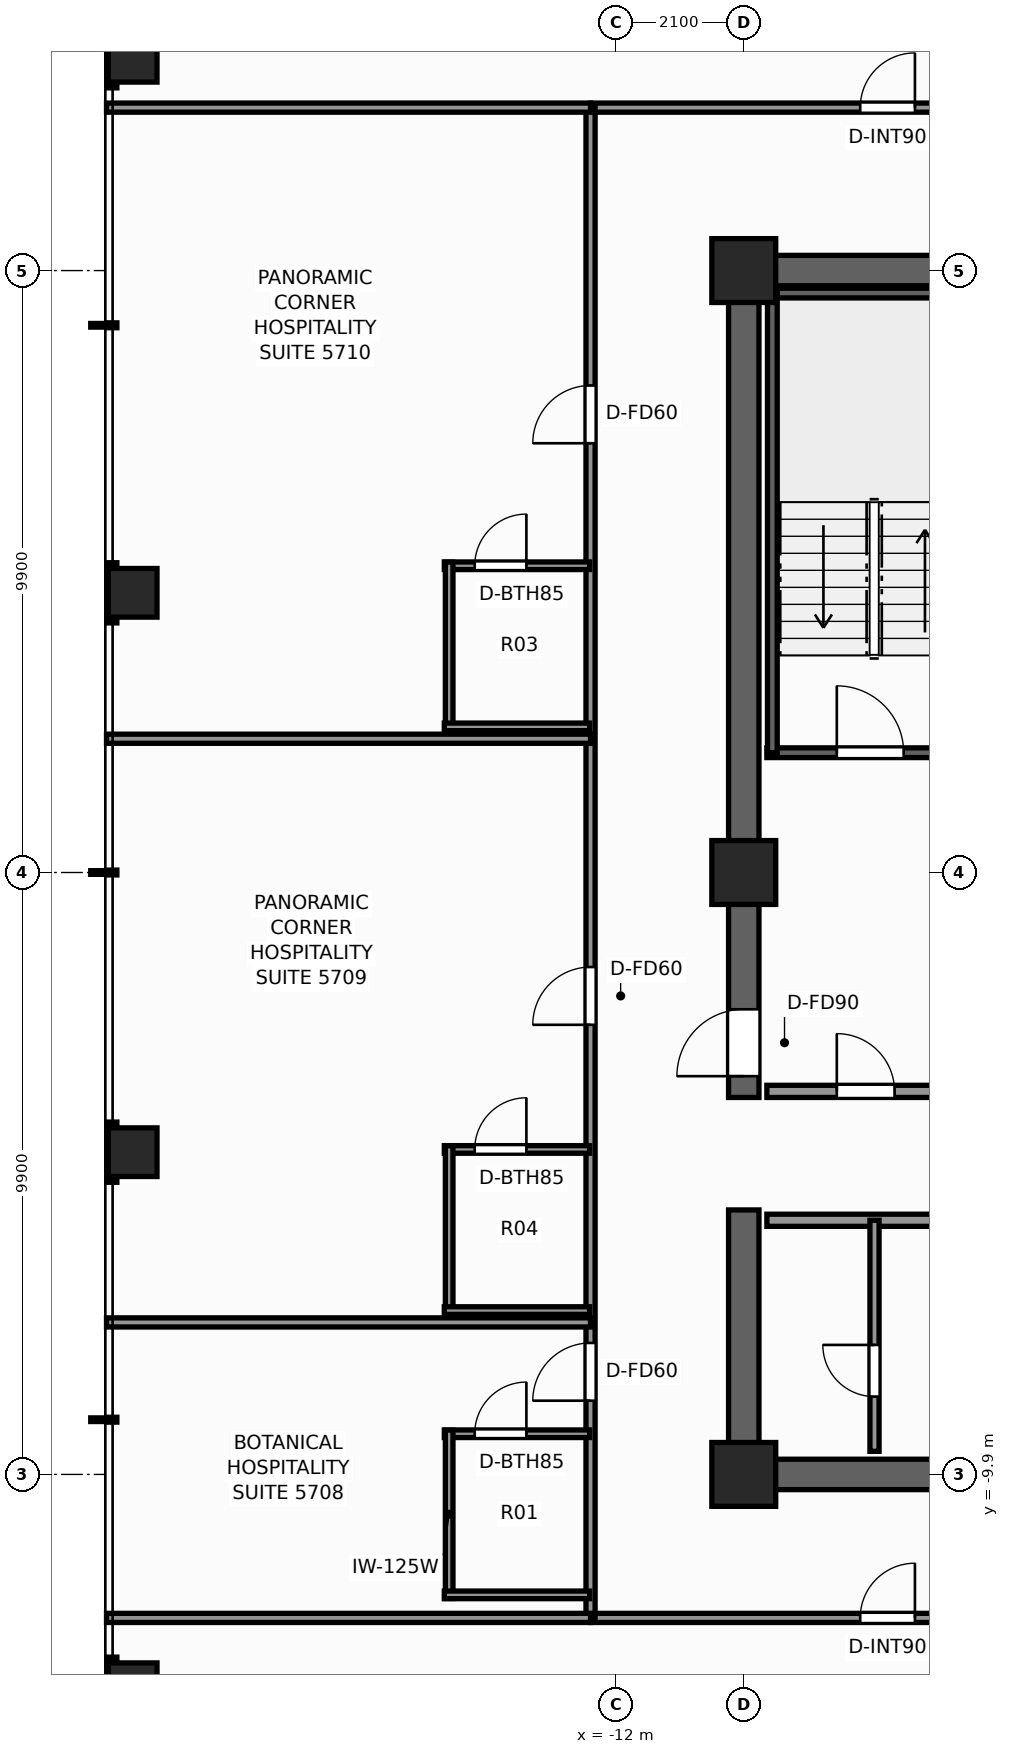
"""IFC4 building model, lengths in metres.
Left out: names, types, materials, properties, quantities, classifications, styles, units other than length and angle.
Written with IfcOpenShell. Run it as: python <this file> out.ifc"""

import sys

from ifc_helpers import new_model, si_unit, direction, frame, frame_2d, origin, origin_2d, place, context, subcontext, project, spatial, rectangle, extrude, element, fill, save


model = new_model("IFC4")
c1 = context("Model", 3, precision=1e-05, world=origin(), true_north=direction((0.0, 1.0)))
c2 = subcontext(c1, "Body", "Model", "MODEL_VIEW")
j1 = project(units=[si_unit("LENGTHUNIT", "METRE"), si_unit("PLANEANGLEUNIT", "RADIAN")], contexts=[c1])
p1 = place(None, origin())
s1 = spatial("IfcSite", under=j1, at=p1, CompositionType="ELEMENT")
p2 = place(p1, origin())
s2 = spatial("IfcBuilding", under=s1, at=p2, CompositionType="ELEMENT")
p3 = place(p2, frame((0.0, 0.0, 196.5)))
s3 = spatial("IfcBuildingStorey", under=s2, at=p3, CompositionType="ELEMENT", Elevation=196.5)
p4 = place(p3, frame((-3.54, -9.9, 0.0), z_axis=(0.0, 0.0, 1.0), x_axis=(-1.0, 0.0, 0.0)))
e1 = element("IfcWall", 1, at=p4, inside=s3, PredefinedType="SHEAR", context=c2, shape_type="SweptSolid", body=[
    extrude(rectangle(XDim=6.61, YDim=0.5, at=frame_2d((3.305, 0.0))), origin(), (0.0, 0.0, 1.0), 3.3),
])
p5 = place(p3, frame((-10.15, 9.9, 0.0), z_axis=(0.0, 0.0, 1.0), x_axis=(1.0, 0.0, 0.0)))
e2 = element("IfcWall", 2, at=p5, inside=s3, PredefinedType="SHEAR", context=c2, shape_type="SweptSolid", body=[
    extrude(rectangle(XDim=14.57, YDim=0.5, at=frame_2d((7.285, 0.0))), origin(), (0.0, 0.0, 1.0), 3.3),
])
p6 = place(p3, frame((-9.9, -9.65, 0.0), z_axis=(0.0, 0.0, 1.0), x_axis=(0.0, 1.0, 0.0)))
e3 = element("IfcWall", 3, at=p6, inside=s3, PredefinedType="SHEAR", context=c2, shape_type="SweptSolid", body=[
    extrude(rectangle(XDim=4.1, YDim=0.5, at=frame_2d((2.05, 0.0))), origin(), (0.0, 0.0, 1.0), 3.3),
])
p7 = place(p3, frame((-9.9, -3.7, 0.0), z_axis=(0.0, 0.0, 1.0), x_axis=(0.0, 1.0, 0.0)))
e4 = element("IfcWall", 4, at=p7, inside=s3, PredefinedType="SHEAR", context=c2, shape_type="SweptSolid", body=[
    extrude(rectangle(XDim=13.35, YDim=0.5, at=frame_2d((6.675, 0.0))), origin(), (0.0, 0.0, 1.0), 3.3),
])
p8 = place(p7, frame((0.35, 0.0, 0.0)))
e5 = element("IfcOpeningElement", 5, at=p8, cuts=e4, PredefinedType="OPENING", context=c2, shape_type="SweptSolid", body=[
    extrude(rectangle(XDim=1.1, YDim=2.2, at=frame_2d((0.55, 1.1))), frame((0.0, 0.26, 0.0), z_axis=(0.0, -1.0, 0.0), x_axis=(1.0, 0.0, 0.0)), (0.0, 0.0, 1.0), 0.52),
])
for number, where, z_axis, x_axis in (
    (6, (-9.9, -9.9, 0.0), (0.0, 0.0, 1.0), (1.0, 0.0, 0.0)),
    (7, (-9.9, 9.9, 0.0), (0.0, 0.0, 1.0), (1.0, 0.0, 0.0)),
    (8, (-9.9, 0.0, 0.0), (0.0, 0.0, 1.0), (1.0, 0.0, 0.0)),
):
    element("IfcColumn", number, at=place(p3, frame(where, z_axis=z_axis, x_axis=x_axis)), inside=s3, PredefinedType="COLUMN", context=c2, shape_type="SweptSolid", body=[
        extrude(rectangle(XDim=1.05, YDim=1.05, at=origin_2d()), origin(), (0.0, 0.0, 1.0), 3.3),
    ])
for number, where, z_axis, x_axis in (
    (9, (-19.95, -13.4, 0.0), (0.0, 0.0, 1.0), (1.0, 0.0, 0.0)),
    (10, (-19.95, -4.6, 0.0), (0.0, 0.0, 1.0), (1.0, 0.0, 0.0)),
    (11, (-19.95, 4.6, 0.0), (0.0, 0.0, 1.0), (1.0, 0.0, 0.0)),
    (12, (-19.95, 13.4, 0.0), (0.0, 0.0, 1.0), (1.0, 0.0, 0.0)),
):
    element("IfcColumn", number, at=place(p3, frame(where, z_axis=z_axis, x_axis=x_axis)), inside=s3, PredefinedType="COLUMN", context=c2, shape_type="SweptSolid", body=[
        extrude(rectangle(XDim=0.8, YDim=0.8, at=origin_2d()), origin(), (0.0, 0.0, 1.0), 3.3),
    ])
p9 = place(p3, frame((-9.52, 1.97, 0.0), z_axis=(0.0, 0.0, 1.0), x_axis=(1.0, 0.0, 0.0)))
e13 = element("IfcWall", 13, at=p9, inside=s3, PredefinedType="SHEAR", context=c2, shape_type="SweptSolid", body=[
    extrude(rectangle(XDim=3.52, YDim=0.16, at=frame_2d((1.76, 0.0))), origin(), (0.0, 0.0, 1.0), 3.3),
])
p10 = place(p9, frame((1.15, 0.0, 0.0)))
e14 = element("IfcOpeningElement", 14, at=p10, cuts=e13, PredefinedType="OPENING", context=c2, shape_type="SweptSolid", body=[
    extrude(rectangle(XDim=1.1, YDim=2.2, at=frame_2d((0.55, 1.1))), frame((0.0, 0.09, 0.0), z_axis=(0.0, -1.0, 0.0), x_axis=(1.0, 0.0, 0.0)), (0.0, 0.0, 1.0), 0.18),
])
p11 = place(p3, frame((-9.52, 9.53, 0.0), z_axis=(0.0, 0.0, 1.0), x_axis=(1.0, 0.0, 0.0)))
e15 = element("IfcWall", 15, at=p11, inside=s3, PredefinedType="SHEAR", context=c2, shape_type="SweptSolid", body=[
    extrude(rectangle(XDim=3.52, YDim=0.16, at=frame_2d((1.76, 0.0))), origin(), (0.0, 0.0, 1.0), 3.3),
])
p12 = place(p3, frame((-9.43, 1.97, 0.0), z_axis=(0.0, 0.0, 1.0), x_axis=(0.0, 1.0, 0.0)))
e16 = element("IfcWall", 16, at=p12, inside=s3, PredefinedType="SHEAR", context=c2, shape_type="SweptSolid", body=[
    extrude(rectangle(XDim=7.56, YDim=0.16, at=frame_2d((3.78, 0.0))), origin(), (0.0, 0.0, 1.0), 3.3),
])
p13 = place(p3, frame((-9.52, -3.6, 0.0), z_axis=(0.0, 0.0, 1.0), x_axis=(1.0, 0.0, 0.0)))
e17 = element("IfcWall", 17, at=p13, inside=s3, PredefinedType="SOLIDWALL", context=c2, shape_type="SweptSolid", body=[
    extrude(rectangle(XDim=3.77, YDim=0.2, at=frame_2d((1.885, 0.0))), origin(), (0.0, 0.0, 1.0), 3.08),
])
p14 = place(p13, frame((1.15, 0.0, 0.0)))
e18 = element("IfcOpeningElement", 18, at=p14, cuts=e17, PredefinedType="OPENING", context=c2, shape_type="SweptSolid", body=[
    extrude(rectangle(XDim=0.95, YDim=2.06, at=frame_2d((0.475, 1.03))), frame((0.0, 0.11, 0.0), z_axis=(0.0, -1.0, 0.0), x_axis=(1.0, 0.0, 0.0)), (0.0, 0.0, 1.0), 0.22),
])
p15 = place(p3, frame((-9.52, -5.72, 0.0), z_axis=(0.0, 0.0, 1.0), x_axis=(1.0, 0.0, 0.0)))
e19 = element("IfcWall", 19, at=p15, inside=s3, PredefinedType="SOLIDWALL", context=c2, shape_type="SweptSolid", body=[
    extrude(rectangle(XDim=5.66, YDim=0.2, at=frame_2d((2.83, 0.0))), origin(), (0.0, 0.0, 1.0), 3.08),
])
p16 = place(p15, frame((2.8, 0.0, 0.0)))
e20 = element("IfcOpeningElement", 20, at=p16, cuts=e19, PredefinedType="OPENING", context=c2, shape_type="SweptSolid", body=[
    extrude(rectangle(XDim=0.95, YDim=2.06, at=frame_2d((0.475, 1.03))), frame((0.0, 0.11, 0.0), z_axis=(0.0, -1.0, 0.0), x_axis=(1.0, 0.0, 0.0)), (0.0, 0.0, 1.0), 0.22),
])
p17 = place(p3, frame((-7.75, -9.52, 0.0), z_axis=(0.0, 0.0, 1.0), x_axis=(0.0, 1.0, 0.0)))
e21 = element("IfcWall", 21, at=p17, inside=s3, PredefinedType="PARTITIONING", context=c2, shape_type="SweptSolid", body=[
    extrude(rectangle(XDim=3.8, YDim=0.15, at=frame_2d((1.9, 0.0))), origin(), (0.0, 0.0, 1.0), 3.08),
])
p18 = place(p17, frame((0.9, 0.0, 0.0)))
e22 = element("IfcOpeningElement", 22, at=p18, cuts=e21, PredefinedType="OPENING", context=c2, shape_type="SweptSolid", body=[
    extrude(rectangle(XDim=0.85, YDim=2.03, at=frame_2d((0.425, 1.015))), frame((0.0, 0.085, 0.0), z_axis=(0.0, -1.0, 0.0), x_axis=(1.0, 0.0, 0.0)), (0.0, 0.0, 1.0), 0.17),
])
p19 = place(p3, frame((-12.42, -12.26, 0.0), z_axis=(0.0, 0.0, 1.0), x_axis=(1.0, 0.0, 0.0)))
e23 = element("IfcWall", 23, at=p19, inside=s3, PredefinedType="PARTITIONING", context=c2, shape_type="SweptSolid", body=[
    extrude(rectangle(XDim=24.84, YDim=0.15, at=frame_2d((12.42, 0.0))), origin(), (0.0, 0.0, 1.0), 2.369),
])
p20 = place(p19, frame((4.435, 0.0, 0.0)))
e24 = element("IfcOpeningElement", 24, at=p20, cuts=e23, PredefinedType="OPENING", context=c2, shape_type="SweptSolid", body=[
    extrude(rectangle(XDim=0.9, YDim=2.06, at=frame_2d((0.45, 1.03))), frame((0.0, 0.085, 0.0), z_axis=(0.0, -1.0, 0.0), x_axis=(1.0, 0.0, 0.0)), (0.0, 0.0, 1.0), 0.17),
])
p21 = place(p19, frame((19.505, 0.0, 0.0)))
e25 = element("IfcOpeningElement", 25, at=p21, cuts=e23, PredefinedType="OPENING", context=c2, shape_type="SweptSolid", body=[
    extrude(rectangle(XDim=0.9, YDim=2.06, at=frame_2d((0.45, 1.03))), frame((0.0, 0.085, 0.0), z_axis=(0.0, -1.0, 0.0), x_axis=(1.0, 0.0, 0.0)), (0.0, 0.0, 1.0), 0.17),
])
p22 = place(p3, frame((-12.42, 12.58, 0.0), z_axis=(0.0, 0.0, 1.0), x_axis=(1.0, 0.0, 0.0)))
e26 = element("IfcWall", 26, at=p22, inside=s3, PredefinedType="PARTITIONING", context=c2, shape_type="SweptSolid", body=[
    extrude(rectangle(XDim=24.84, YDim=0.15, at=frame_2d((12.42, 0.0))), origin(), (0.0, 0.0, 1.0), 2.369),
])
p23 = place(p22, frame((4.435, 0.0, 0.0)))
e27 = element("IfcOpeningElement", 27, at=p23, cuts=e26, PredefinedType="OPENING", context=c2, shape_type="SweptSolid", body=[
    extrude(rectangle(XDim=0.9, YDim=2.06, at=frame_2d((0.45, 1.03))), frame((0.0, 0.085, 0.0), z_axis=(0.0, -1.0, 0.0), x_axis=(1.0, 0.0, 0.0)), (0.0, 0.0, 1.0), 0.17),
])
p24 = place(p22, frame((19.505, 0.0, 0.0)))
e28 = element("IfcOpeningElement", 28, at=p24, cuts=e26, PredefinedType="OPENING", context=c2, shape_type="SweptSolid", body=[
    extrude(rectangle(XDim=0.9, YDim=2.06, at=frame_2d((0.45, 1.03))), frame((0.0, 0.085, 0.0), z_axis=(0.0, -1.0, 0.0), x_axis=(1.0, 0.0, 0.0)), (0.0, 0.0, 1.0), 0.17),
])
p25 = place(p3, frame((-12.42, -12.26, 0.0), z_axis=(0.0, 0.0, 1.0), x_axis=(0.0, 1.0, 0.0)))
e29 = element("IfcWall", 29, at=p25, inside=s3, PredefinedType="PARTITIONING", context=c2, shape_type="SweptSolid", body=[
    extrude(rectangle(XDim=24.84, YDim=0.15, at=frame_2d((12.42, 0.0))), origin(), (0.0, 0.0, 1.0), 2.369),
])
p26 = place(p25, frame((3.573, 0.0, 0.0)))
e30 = element("IfcOpeningElement", 30, at=p26, cuts=e29, PredefinedType="OPENING", context=c2, shape_type="SweptSolid", body=[
    extrude(rectangle(XDim=0.95, YDim=2.06, at=frame_2d((0.475, 1.03))), frame((0.0, 0.085, 0.0), z_axis=(0.0, -1.0, 0.0), x_axis=(1.0, 0.0, 0.0)), (0.0, 0.0, 1.0), 0.17),
])
p27 = place(p25, frame((9.755, 0.0, 0.0)))
e31 = element("IfcOpeningElement", 31, at=p27, cuts=e29, PredefinedType="OPENING", context=c2, shape_type="SweptSolid", body=[
    extrude(rectangle(XDim=0.95, YDim=2.06, at=frame_2d((0.475, 1.03))), frame((0.0, 0.085, 0.0), z_axis=(0.0, -1.0, 0.0), x_axis=(1.0, 0.0, 0.0)), (0.0, 0.0, 1.0), 0.17),
])
p28 = place(p25, frame((19.32, 0.0, 0.0)))
e32 = element("IfcOpeningElement", 32, at=p28, cuts=e29, PredefinedType="OPENING", context=c2, shape_type="SweptSolid", body=[
    extrude(rectangle(XDim=0.95, YDim=2.06, at=frame_2d((0.475, 1.03))), frame((0.0, 0.085, 0.0), z_axis=(0.0, -1.0, 0.0), x_axis=(1.0, 0.0, 0.0)), (0.0, 0.0, 1.0), 0.17),
])
for number, where, z_axis, x_axis in (
    (33, (-20.38, -12.26, 0.0), (0.0, 0.0, 1.0), (1.0, 0.0, 0.0)),
    (34, (-20.38, 12.58, 0.0), (0.0, 0.0, 1.0), (1.0, 0.0, 0.0)),
):
    element("IfcWall", number, at=place(p3, frame(where, z_axis=z_axis, x_axis=x_axis)), inside=s3, PredefinedType="PARTITIONING", context=c2, shape_type="SweptSolid", body=[
        extrude(rectangle(XDim=7.96, YDim=0.15, at=frame_2d((3.98, 0.0))), origin(), (0.0, 0.0, 1.0), 2.369),
    ])
p29 = place(p3, frame((-20.38, -7.4, 0.0), z_axis=(0.0, 0.0, 1.0), x_axis=(1.0, 0.0, 0.0)))
e35 = element("IfcWall", 35, at=p29, inside=s3, PredefinedType="PARTITIONING", context=c2, shape_type="SweptSolid", body=[
    extrude(rectangle(XDim=7.96, YDim=0.15, at=frame_2d((3.98, 0.0))), origin(), (0.0, 0.0, 1.0), 2.453),
])
p30 = place(p3, frame((-14.825, -9.231, 0.0), z_axis=(0.0, 0.0, 1.0), x_axis=(1.0, 0.0, 0.0)))
e36 = element("IfcWall", 36, at=p30, inside=s3, PredefinedType="PARTITIONING", context=c2, shape_type="SweptSolid", body=[
    extrude(rectangle(XDim=2.39, YDim=0.125, at=frame_2d((1.195, 0.0))), origin(), (0.0, 0.0, 1.0), 3.08),
])
p31 = place(p30, frame((0.5, 0.0, 0.0)))
e37 = element("IfcOpeningElement", 37, at=p31, cuts=e36, PredefinedType="OPENING", context=c2, shape_type="SweptSolid", body=[
    extrude(rectangle(XDim=0.85, YDim=2.03, at=frame_2d((0.425, 1.015))), frame((0.0, 0.073, 0.0), z_axis=(0.0, -1.0, 0.0), x_axis=(1.0, 0.0, 0.0)), (0.0, 0.0, 1.0), 0.145),
])
p32 = place(p3, frame((-14.745, -11.941, 0.0), z_axis=(0.0, 0.0, 1.0), x_axis=(0.0, 1.0, 0.0)))
e38 = element("IfcWall", 38, at=p32, inside=s3, PredefinedType="PARTITIONING", context=c2, shape_type="SweptSolid", body=[
    extrude(rectangle(XDim=2.77, YDim=0.125, at=frame_2d((1.385, 0.0))), origin(), (0.0, 0.0, 1.0), 2.369),
])
p33 = place(p3, frame((-14.825, -11.881, 0.0), z_axis=(0.0, 0.0, 1.0), x_axis=(1.0, 0.0, 0.0)))
e39 = element("IfcWall", 39, at=p33, inside=s3, PredefinedType="PARTITIONING", context=c2, shape_type="SweptSolid", body=[
    extrude(rectangle(XDim=2.39, YDim=0.125, at=frame_2d((1.195, 0.0))), origin(), (0.0, 0.0, 1.0), 3.08),
])
p34 = place(p3, frame((-20.38, 2.2, 0.0), z_axis=(0.0, 0.0, 1.0), x_axis=(1.0, 0.0, 0.0)))
e40 = element("IfcWall", 40, at=p34, inside=s3, PredefinedType="PARTITIONING", context=c2, shape_type="SweptSolid", body=[
    extrude(rectangle(XDim=7.96, YDim=0.15, at=frame_2d((3.98, 0.0))), origin(), (0.0, 0.0, 1.0), 2.453),
])
p35 = place(p3, frame((-14.825, -4.555, 0.0), z_axis=(0.0, 0.0, 1.0), x_axis=(1.0, 0.0, 0.0)))
e41 = element("IfcWall", 41, at=p35, inside=s3, PredefinedType="PARTITIONING", context=c2, shape_type="SweptSolid", body=[
    extrude(rectangle(XDim=2.39, YDim=0.125, at=frame_2d((1.195, 0.0))), origin(), (0.0, 0.0, 1.0), 2.369),
])
p36 = place(p35, frame((0.5, 0.0, 0.0)))
e42 = element("IfcOpeningElement", 42, at=p36, cuts=e41, PredefinedType="OPENING", context=c2, shape_type="SweptSolid", body=[
    extrude(rectangle(XDim=0.85, YDim=2.03, at=frame_2d((0.425, 1.015))), frame((0.0, 0.073, 0.0), z_axis=(0.0, -1.0, 0.0), x_axis=(1.0, 0.0, 0.0)), (0.0, 0.0, 1.0), 0.145),
])
p37 = place(p3, frame((-14.745, -7.265, 0.0), z_axis=(0.0, 0.0, 1.0), x_axis=(0.0, 1.0, 0.0)))
e43 = element("IfcWall", 43, at=p37, inside=s3, PredefinedType="PARTITIONING", context=c2, shape_type="SweptSolid", body=[
    extrude(rectangle(XDim=2.77, YDim=0.125, at=frame_2d((1.385, 0.0))), origin(), (0.0, 0.0, 1.0), 2.369),
])
p38 = place(p3, frame((-14.825, -7.205, 0.0), z_axis=(0.0, 0.0, 1.0), x_axis=(1.0, 0.0, 0.0)))
e44 = element("IfcWall", 44, at=p38, inside=s3, PredefinedType="PARTITIONING", context=c2, shape_type="SweptSolid", body=[
    extrude(rectangle(XDim=2.39, YDim=0.125, at=frame_2d((1.195, 0.0))), origin(), (0.0, 0.0, 1.0), 3.08),
])
p39 = place(p3, frame((-14.825, 5.045, 0.0), z_axis=(0.0, 0.0, 1.0), x_axis=(1.0, 0.0, 0.0)))
e45 = element("IfcWall", 45, at=p39, inside=s3, PredefinedType="PARTITIONING", context=c2, shape_type="SweptSolid", body=[
    extrude(rectangle(XDim=2.39, YDim=0.125, at=frame_2d((1.195, 0.0))), origin(), (0.0, 0.0, 1.0), 3.08),
])
p40 = place(p39, frame((0.5, 0.0, 0.0)))
e46 = element("IfcOpeningElement", 46, at=p40, cuts=e45, PredefinedType="OPENING", context=c2, shape_type="SweptSolid", body=[
    extrude(rectangle(XDim=0.85, YDim=2.03, at=frame_2d((0.425, 1.015))), frame((0.0, 0.073, 0.0), z_axis=(0.0, -1.0, 0.0), x_axis=(1.0, 0.0, 0.0)), (0.0, 0.0, 1.0), 0.145),
])
p41 = place(p3, frame((-14.745, 2.335, 0.0), z_axis=(0.0, 0.0, 1.0), x_axis=(0.0, 1.0, 0.0)))
e47 = element("IfcWall", 47, at=p41, inside=s3, PredefinedType="PARTITIONING", context=c2, shape_type="SweptSolid", body=[
    extrude(rectangle(XDim=2.77, YDim=0.125, at=frame_2d((1.385, 0.0))), origin(), (0.0, 0.0, 1.0), 2.369),
])
p42 = place(p3, frame((-14.825, 2.395, 0.0), z_axis=(0.0, 0.0, 1.0), x_axis=(1.0, 0.0, 0.0)))
e48 = element("IfcWall", 48, at=p42, inside=s3, PredefinedType="PARTITIONING", context=c2, shape_type="SweptSolid", body=[
    extrude(rectangle(XDim=2.39, YDim=0.125, at=frame_2d((1.195, 0.0))), origin(), (0.0, 0.0, 1.0), 3.08),
])
p43 = place(p10, origin())
e49 = element("IfcDoor", 49, at=p43, inside=s3, OperationType="SINGLE_SWING_LEFT", PredefinedType="DOOR", context=c2, shape_type="SweptSolid", body=[
    extrude(rectangle(XDim=1.1, YDim=2.2, at=frame_2d((0.55, 1.1))), frame((0.0, 0.025, 0.0), z_axis=(0.0, -1.0, 0.0), x_axis=(1.0, 0.0, 0.0)), (0.0, 0.0, 1.0), 0.05),
])
fill(e14, e49)
p44 = place(p8, origin())
e50 = element("IfcDoor", 50, at=p44, inside=s3, OperationType="SINGLE_SWING_LEFT", PredefinedType="DOOR", context=c2, shape_type="SweptSolid", body=[
    extrude(rectangle(XDim=1.1, YDim=2.2, at=frame_2d((0.55, 1.1))), frame((0.0, 0.025, 0.0), z_axis=(0.0, -1.0, 0.0), x_axis=(1.0, 0.0, 0.0)), (0.0, 0.0, 1.0), 0.05),
])
fill(e5, e50)
p45 = place(p18, origin())
e51 = element("IfcDoor", 51, at=p45, inside=s3, OperationType="SINGLE_SWING_RIGHT", PredefinedType="DOOR", context=c2, shape_type="SweptSolid", body=[
    extrude(rectangle(XDim=0.85, YDim=2.03, at=frame_2d((0.425, 1.015))), frame((0.0, 0.025, 0.0), z_axis=(0.0, -1.0, 0.0), x_axis=(1.0, 0.0, 0.0)), (0.0, 0.0, 1.0), 0.05),
])
fill(e22, e51)
p46 = place(p14, origin())
e52 = element("IfcDoor", 52, at=p46, inside=s3, OperationType="SINGLE_SWING_LEFT", PredefinedType="DOOR", context=c2, shape_type="SweptSolid", body=[
    extrude(rectangle(XDim=0.95, YDim=2.06, at=frame_2d((0.475, 1.03))), frame((0.0, 0.025, 0.0), z_axis=(0.0, -1.0, 0.0), x_axis=(1.0, 0.0, 0.0)), (0.0, 0.0, 1.0), 0.05),
])
fill(e18, e52)
p47 = place(p20, origin())
e53 = element("IfcDoor", 53, at=p47, inside=s3, OperationType="SINGLE_SWING_RIGHT", PredefinedType="DOOR", context=c2, shape_type="SweptSolid", body=[
    extrude(rectangle(XDim=0.9, YDim=2.06, at=frame_2d((0.45, 1.03))), frame((0.0, 0.025, 0.0), z_axis=(0.0, -1.0, 0.0), x_axis=(1.0, 0.0, 0.0)), (0.0, 0.0, 1.0), 0.05),
])
fill(e24, e53)
p48 = place(p31, origin())
e54 = element("IfcDoor", 54, at=p48, inside=s3, OperationType="SINGLE_SWING_RIGHT", PredefinedType="DOOR", context=c2, shape_type="SweptSolid", body=[
    extrude(rectangle(XDim=0.85, YDim=2.03, at=frame_2d((0.425, 1.015))), frame((0.0, 0.025, 0.0), z_axis=(0.0, -1.0, 0.0), x_axis=(1.0, 0.0, 0.0)), (0.0, 0.0, 1.0), 0.05),
])
fill(e37, e54)
p49 = place(p26, origin())
e55 = element("IfcDoor", 55, at=p49, inside=s3, OperationType="SINGLE_SWING_LEFT", PredefinedType="DOOR", context=c2, shape_type="SweptSolid", body=[
    extrude(rectangle(XDim=0.95, YDim=2.06, at=frame_2d((0.475, 1.03))), frame((0.0, 0.025, 0.0), z_axis=(0.0, -1.0, 0.0), x_axis=(1.0, 0.0, 0.0)), (0.0, 0.0, 1.0), 0.05),
])
fill(e30, e55)
p50 = place(p36, origin())
e56 = element("IfcDoor", 56, at=p50, inside=s3, OperationType="SINGLE_SWING_RIGHT", PredefinedType="DOOR", context=c2, shape_type="SweptSolid", body=[
    extrude(rectangle(XDim=0.85, YDim=2.03, at=frame_2d((0.425, 1.015))), frame((0.0, 0.025, 0.0), z_axis=(0.0, -1.0, 0.0), x_axis=(1.0, 0.0, 0.0)), (0.0, 0.0, 1.0), 0.05),
])
fill(e42, e56)
p51 = place(p27, origin())
e57 = element("IfcDoor", 57, at=p51, inside=s3, OperationType="SINGLE_SWING_LEFT", PredefinedType="DOOR", context=c2, shape_type="SweptSolid", body=[
    extrude(rectangle(XDim=0.95, YDim=2.06, at=frame_2d((0.475, 1.03))), frame((0.0, 0.025, 0.0), z_axis=(0.0, -1.0, 0.0), x_axis=(1.0, 0.0, 0.0)), (0.0, 0.0, 1.0), 0.05),
])
fill(e31, e57)
p52 = place(p40, origin())
e58 = element("IfcDoor", 58, at=p52, inside=s3, OperationType="SINGLE_SWING_RIGHT", PredefinedType="DOOR", context=c2, shape_type="SweptSolid", body=[
    extrude(rectangle(XDim=0.85, YDim=2.03, at=frame_2d((0.425, 1.015))), frame((0.0, 0.025, 0.0), z_axis=(0.0, -1.0, 0.0), x_axis=(1.0, 0.0, 0.0)), (0.0, 0.0, 1.0), 0.05),
])
fill(e46, e58)
p53 = place(p28, origin())
e59 = element("IfcDoor", 59, at=p53, inside=s3, OperationType="SINGLE_SWING_LEFT", PredefinedType="DOOR", context=c2, shape_type="SweptSolid", body=[
    extrude(rectangle(XDim=0.95, YDim=2.06, at=frame_2d((0.475, 1.03))), frame((0.0, 0.025, 0.0), z_axis=(0.0, -1.0, 0.0), x_axis=(1.0, 0.0, 0.0)), (0.0, 0.0, 1.0), 0.05),
])
fill(e32, e59)
p54 = place(p23, origin())
e60 = element("IfcDoor", 60, at=p54, inside=s3, OperationType="SINGLE_SWING_RIGHT", PredefinedType="DOOR", context=c2, shape_type="SweptSolid", body=[
    extrude(rectangle(XDim=0.9, YDim=2.06, at=frame_2d((0.45, 1.03))), frame((0.0, 0.025, 0.0), z_axis=(0.0, -1.0, 0.0), x_axis=(1.0, 0.0, 0.0)), (0.0, 0.0, 1.0), 0.05),
])
fill(e27, e60)
save(model, sys.argv[1])
